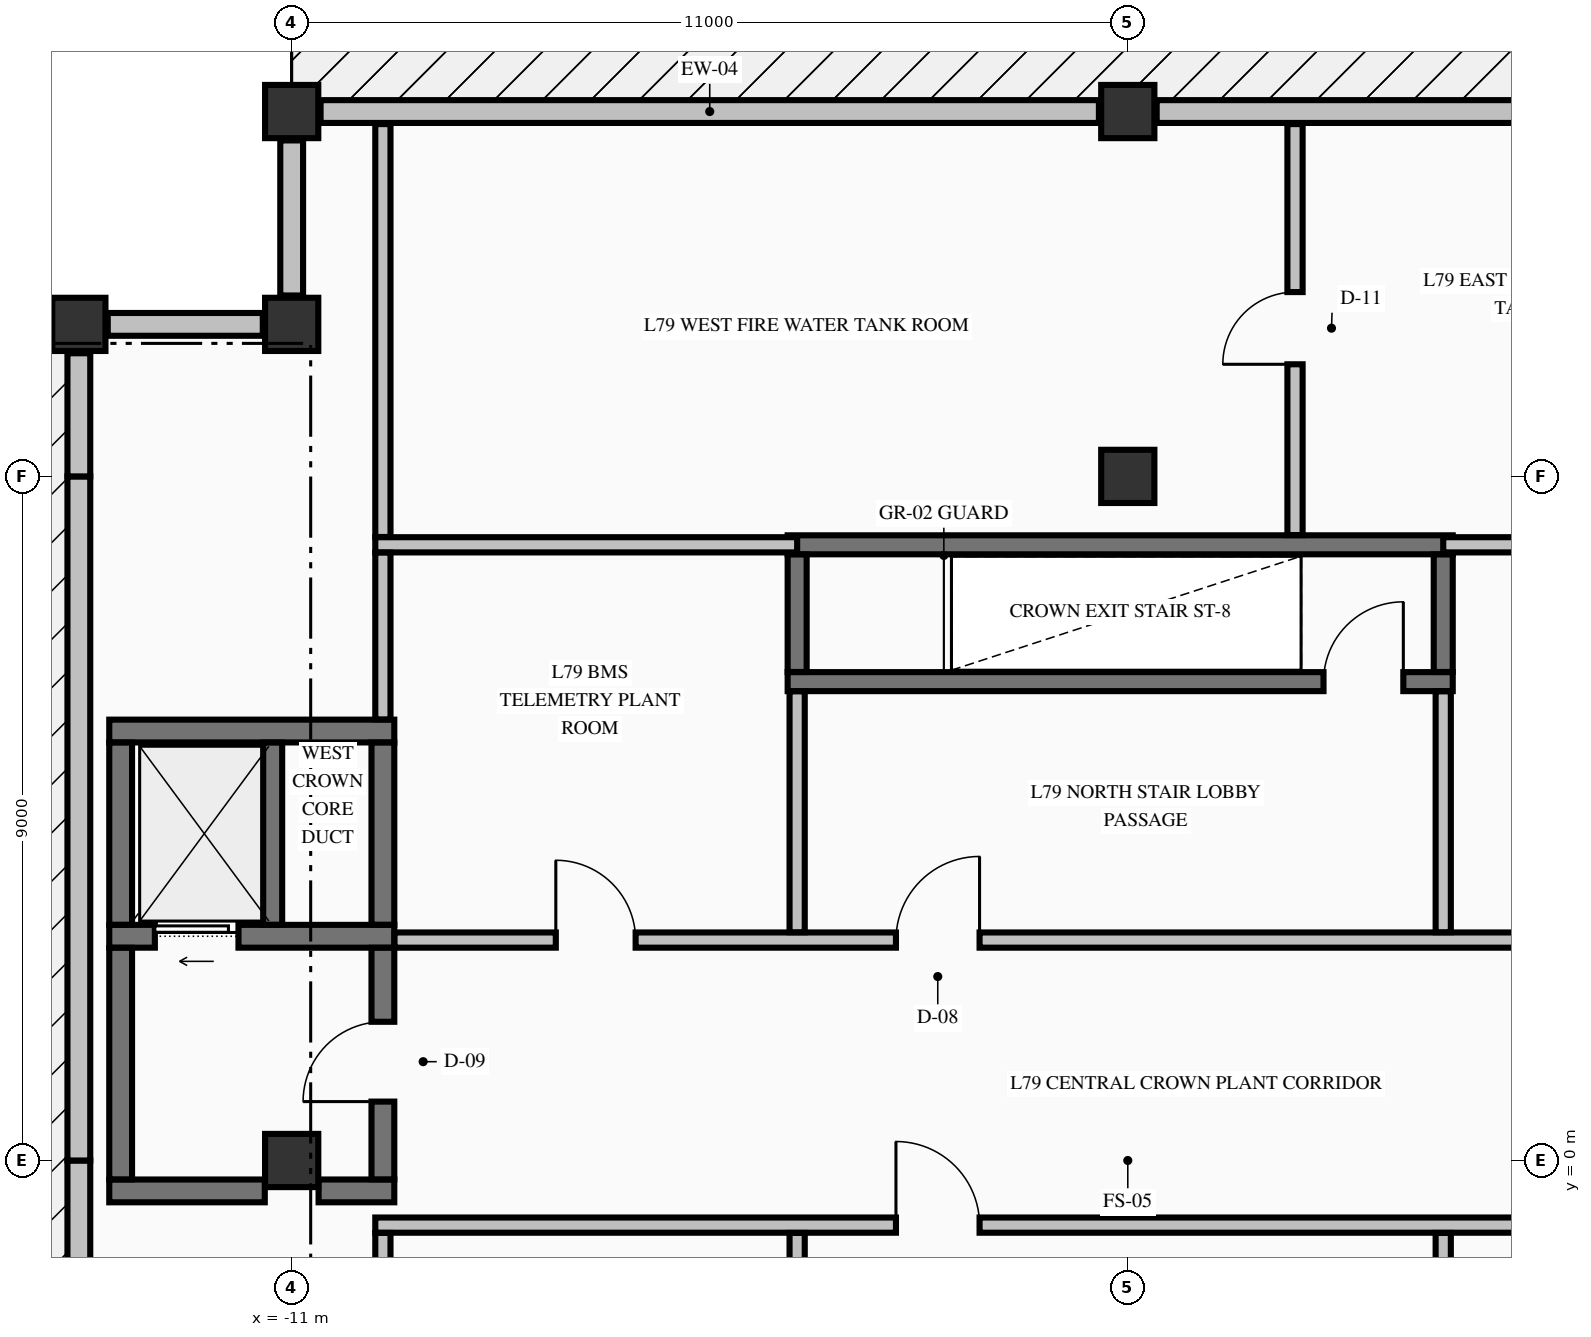
"""IFC4 building model, lengths in metres.
Left out: names, types, materials, properties, quantities, classifications, styles, units other than length and angle.
Written with IfcOpenShell. Run it as: python <this file> out.ifc"""

import sys

from ifc_helpers import new_model, si_unit, direction, frame, frame_2d, origin, origin_2d, place, context, subcontext, project, spatial, rectangle, extrude, element, fill, save


model = new_model("IFC4")
c1 = context("Model", 3, precision=1e-05, world=origin(), true_north=direction((0.0, 1.0)))
c2 = subcontext(c1, "Body", "Model", "MODEL_VIEW")
j1 = project(units=[si_unit("LENGTHUNIT", "METRE"), si_unit("PLANEANGLEUNIT", "RADIAN")], contexts=[c1])
p1 = place(None, origin())
s1 = spatial("IfcSite", under=j1, at=p1, CompositionType="ELEMENT")
p2 = place(p1, origin())
s2 = spatial("IfcBuilding", under=s1, at=p2, CompositionType="ELEMENT")
p3 = place(p2, frame((0.0, 0.0, 294.04)))
s3 = spatial("IfcBuildingStorey", under=s2, at=p3, CompositionType="ELEMENT", Elevation=294.04)
for number, where, z_axis, x_axis in (
    (1, (0.0, 13.8, -0.325), (0.0, 0.0, 1.0), (1.0, 0.0, 0.0)),
    (2, (-11.0, 13.8, -0.325), (0.0, 0.0, 1.0), (1.0, 0.0, 0.0)),
    (3, (-13.8, 11.0, -0.325), (0.0, 0.0, 1.0), (1.0, 0.0, 0.0)),
    (4, (-11.0, 11.0, -0.325), (0.0, 0.0, 1.0), (1.0, 0.0, 0.0)),
    (5, (-11.0, 0.0, -0.325), (0.0, 0.0, 1.0), (1.0, 0.0, 0.0)),
    (6, (0.0, 9.0, -0.325), (0.0, 0.0, 1.0), (1.0, 0.0, 0.0)),
):
    element("IfcColumn", number, at=place(p3, frame(where, z_axis=z_axis, x_axis=x_axis)), inside=s3, PredefinedType="COLUMN", context=c2, shape_type="SweptSolid", body=[
        extrude(rectangle(XDim=0.7, YDim=0.7, at=origin_2d()), origin(), (0.0, 0.0, 1.0), 2.935),
    ])
for number, where, z_axis, x_axis in (
    (7, (-0.38, 13.8, 0.0), (0.0, 0.0, 1.0), (-1.0, 0.0, 0.0)),
    (8, (10.62, 13.8, 0.0), (0.0, 0.0, 1.0), (-1.0, 0.0, 0.0)),
):
    element("IfcWall", number, at=place(p3, frame(where, z_axis=z_axis, x_axis=x_axis)), inside=s3, PredefinedType="STANDARD", context=c2, shape_type="SweptSolid", body=[
        extrude(rectangle(XDim=10.24, YDim=0.3, at=frame_2d((5.12, 0.0))), origin(), (0.0, 0.0, 1.0), 2.002),
    ])
for number, where, z_axis, x_axis in (
    (9, (-13.8, 0.0, 0.0), (0.0, 0.0, 1.0), (0.0, -1.0, 0.0)),
    (10, (-13.8, 9.0, 0.0), (0.0, 0.0, 1.0), (0.0, -1.0, 0.0)),
):
    element("IfcWall", number, at=place(p3, frame(where, z_axis=z_axis, x_axis=x_axis)), inside=s3, PredefinedType="STANDARD", context=c2, shape_type="SweptSolid", body=[
        extrude(rectangle(XDim=9.0, YDim=0.3, at=frame_2d((4.5, 0.0))), origin(), (0.0, 0.0, 1.0), 2.002),
    ])
p4 = place(p3, frame((-13.8, 10.62, 0.0), z_axis=(0.0, 0.0, 1.0), x_axis=(0.0, -1.0, 0.0)))
e11 = element("IfcWall", 11, at=p4, inside=s3, PredefinedType="STANDARD", context=c2, shape_type="SweptSolid", body=[
    extrude(rectangle(XDim=1.62, YDim=0.3, at=frame_2d((0.81, 0.0))), origin(), (0.0, 0.0, 1.0), 2.002),
])
for number, where, z_axis, x_axis in (
    (12, (-11.0, 13.42, 0.0), (0.0, 0.0, 1.0), (0.0, -1.0, 0.0)),
    (13, (-11.38, 11.0, 0.0), (0.0, 0.0, 1.0), (-1.0, 0.0, 0.0)),
):
    element("IfcWall", number, at=place(p3, frame(where, z_axis=z_axis, x_axis=x_axis)), inside=s3, PredefinedType="STANDARD", context=c2, shape_type="SweptSolid", body=[
        extrude(rectangle(XDim=2.04, YDim=0.3, at=frame_2d((1.02, 0.0))), origin(), (0.0, 0.0, 1.0), 2.002),
    ])
p5 = place(p3, frame((-13.4, -0.4, 0.0), z_axis=(0.0, 0.0, 1.0), x_axis=(1.0, 0.0, 0.0)))
e14 = element("IfcWall", 14, at=p5, inside=s3, PredefinedType="SHEAR", context=c2, shape_type="SweptSolid", body=[
    extrude(rectangle(XDim=2.046, YDim=0.3, at=frame_2d((1.023, 0.0))), origin(), (0.0, 0.0, 1.0), 2.61),
])
p6 = place(p3, frame((-10.646, -0.4, 0.0), z_axis=(0.0, 0.0, 1.0), x_axis=(1.0, 0.0, 0.0)))
e15 = element("IfcWall", 15, at=p6, inside=s3, PredefinedType="SHEAR", context=c2, shape_type="SweptSolid", body=[
    extrude(rectangle(XDim=0.996, YDim=0.3, at=frame_2d((0.498, 0.0))), origin(), (0.0, 0.0, 1.0), 2.61),
])
p7 = place(p3, frame((-13.4, 2.95, 0.0), z_axis=(0.0, 0.0, 1.0), x_axis=(1.0, 0.0, 0.0)))
e16 = element("IfcWall", 16, at=p7, inside=s3, PredefinedType="SHEAR", context=c2, shape_type="SweptSolid", body=[
    extrude(rectangle(XDim=3.75, YDim=0.3, at=frame_2d((1.875, 0.0))), origin(), (0.0, 0.0, 1.0), 2.61),
])
p8 = place(p7, frame((0.6, 0.0, 0.0)))
e17 = element("IfcOpeningElement", 17, at=p8, cuts=e16, PredefinedType="OPENING", context=c2, shape_type="SweptSolid", body=[
    extrude(rectangle(XDim=1.1, YDim=2.2, at=frame_2d((0.55, 1.1))), frame((0.0, 0.16, 0.0), z_axis=(0.0, -1.0, 0.0), x_axis=(1.0, 0.0, 0.0)), (0.0, 0.0, 1.0), 0.32),
])
p9 = place(p3, frame((-13.4, 5.65, 0.0), z_axis=(0.0, 0.0, 1.0), x_axis=(1.0, 0.0, 0.0)))
e18 = element("IfcWall", 18, at=p9, inside=s3, PredefinedType="SHEAR", context=c2, shape_type="SweptSolid", body=[
    extrude(rectangle(XDim=3.75, YDim=0.3, at=frame_2d((1.875, 0.0))), origin(), (0.0, 0.0, 1.0), 2.61),
])
p10 = place(p3, frame((-4.475, 6.3, 0.0), z_axis=(0.0, 0.0, 1.0), x_axis=(1.0, 0.0, 0.0)))
e19 = element("IfcWall", 19, at=p10, inside=s3, PredefinedType="SOLIDWALL", context=c2, shape_type="SweptSolid", body=[
    extrude(rectangle(XDim=8.75, YDim=0.25, at=frame_2d((4.375, 0.0))), origin(), (0.0, 0.0, 1.0), 2.61),
])
p11 = place(p10, frame((7.05, 0.0, 0.0)))
e20 = element("IfcOpeningElement", 20, at=p11, cuts=e19, PredefinedType="OPENING", context=c2, shape_type="SweptSolid", body=[
    extrude(rectangle(XDim=1.05, YDim=2.15, at=frame_2d((0.525, 1.075))), frame((0.0, 0.135, 0.0), z_axis=(0.0, -1.0, 0.0), x_axis=(1.0, 0.0, 0.0)), (0.0, 0.0, 1.0), 0.27),
])
p12 = place(p3, frame((-4.475, 8.1, 0.0), z_axis=(0.0, 0.0, 1.0), x_axis=(1.0, 0.0, 0.0)))
e21 = element("IfcWall", 21, at=p12, inside=s3, PredefinedType="SOLIDWALL", context=c2, shape_type="SweptSolid", body=[
    extrude(rectangle(XDim=8.75, YDim=0.25, at=frame_2d((4.375, 0.0))), origin(), (0.0, 0.0, 1.0), 2.61),
])
p13 = place(p3, frame((-9.9, -0.85, 0.0), z_axis=(0.0, 0.0, 1.0), x_axis=(1.0, 0.0, 0.0)))
e22 = element("IfcWall", 22, at=p13, inside=s3, PredefinedType="PARTITIONING", context=c2, shape_type="SweptSolid", body=[
    extrude(rectangle(XDim=19.8, YDim=0.2, at=frame_2d((9.9, 0.0))), origin(), (0.0, 0.0, 1.0), 2.61),
])
p14 = place(p13, frame((6.85, 0.0, 0.0)))
e23 = element("IfcOpeningElement", 23, at=p14, cuts=e22, PredefinedType="OPENING", context=c2, shape_type="SweptSolid", body=[
    extrude(rectangle(XDim=1.1, YDim=2.15, at=frame_2d((0.55, 1.075))), frame((0.0, 0.11, 0.0), z_axis=(0.0, -1.0, 0.0), x_axis=(1.0, 0.0, 0.0)), (0.0, 0.0, 1.0), 0.22),
])
p15 = place(p3, frame((-9.647, 2.9, 0.0), z_axis=(0.0, 0.0, 1.0), x_axis=(1.0, 0.0, 0.0)))
e24 = element("IfcWall", 24, at=p15, inside=s3, PredefinedType="PARTITIONING", context=c2, shape_type="SweptSolid", body=[
    extrude(rectangle(XDim=19.294, YDim=0.2, at=frame_2d((9.647, 0.0))), origin(), (0.0, 0.0, 1.0), 2.61),
])
p16 = place(p15, frame((6.597, 0.0, 0.0)))
e25 = element("IfcOpeningElement", 25, at=p16, cuts=e24, PredefinedType="OPENING", context=c2, shape_type="SweptSolid", body=[
    extrude(rectangle(XDim=1.1, YDim=2.15, at=frame_2d((0.55, 1.075))), frame((0.0, 0.11, 0.0), z_axis=(0.0, -1.0, 0.0), x_axis=(1.0, 0.0, 0.0)), (0.0, 0.0, 1.0), 0.22),
])
p17 = place(p15, frame((16.122, 0.0, 0.0)))
e26 = element("IfcOpeningElement", 26, at=p17, cuts=e24, PredefinedType="OPENING", context=c2, shape_type="SweptSolid", body=[
    extrude(rectangle(XDim=1.05, YDim=2.15, at=frame_2d((0.525, 1.075))), frame((0.0, 0.11, 0.0), z_axis=(0.0, -1.0, 0.0), x_axis=(1.0, 0.0, 0.0)), (0.0, 0.0, 1.0), 0.22),
])
p18 = place(p15, frame((2.122, 0.0, 0.0)))
e27 = element("IfcOpeningElement", 27, at=p18, cuts=e24, PredefinedType="OPENING", context=c2, shape_type="SweptSolid", body=[
    extrude(rectangle(XDim=1.05, YDim=2.15, at=frame_2d((0.525, 1.075))), frame((0.0, 0.11, 0.0), z_axis=(0.0, -1.0, 0.0), x_axis=(1.0, 0.0, 0.0)), (0.0, 0.0, 1.0), 0.22),
])
p19 = place(p3, frame((-9.9, 8.1, 0.0), z_axis=(0.0, 0.0, 1.0), x_axis=(1.0, 0.0, 0.0)))
e28 = element("IfcWall", 28, at=p19, inside=s3, PredefinedType="PARTITIONING", context=c2, shape_type="SweptSolid", body=[
    extrude(rectangle(XDim=5.55, YDim=0.2, at=frame_2d((2.775, 0.0))), origin(), (0.0, 0.0, 1.0), 2.61),
])
p20 = place(p3, frame((4.15, 8.1, 0.0), z_axis=(0.0, 0.0, 1.0), x_axis=(1.0, 0.0, 0.0)))
e29 = element("IfcWall", 29, at=p20, inside=s3, PredefinedType="PARTITIONING", context=c2, shape_type="SweptSolid", body=[
    extrude(rectangle(XDim=5.75, YDim=0.2, at=frame_2d((2.875, 0.0))), origin(), (0.0, 0.0, 1.0), 2.61),
])
p21 = place(p20, frame((2.125, 0.0, 0.0)))
e30 = element("IfcOpeningElement", 30, at=p21, cuts=e29, PredefinedType="OPENING", context=c2, shape_type="SweptSolid", body=[
    extrude(rectangle(XDim=1.05, YDim=2.15, at=frame_2d((0.525, 1.075))), frame((0.0, 0.11, 0.0), z_axis=(0.0, -1.0, 0.0), x_axis=(1.0, 0.0, 0.0)), (0.0, 0.0, 1.0), 0.22),
])
p22 = place(p3, frame((-13.25, -0.248, 0.0), z_axis=(0.0, 0.0, 1.0), x_axis=(0.0, 1.0, 0.0)))
e31 = element("IfcWall", 31, at=p22, inside=s3, PredefinedType="SHEAR", context=c2, shape_type="SweptSolid", body=[
    extrude(rectangle(XDim=3.046, YDim=0.3, at=frame_2d((1.523, 0.0))), origin(), (0.0, 0.0, 1.0), 2.61),
])
p23 = place(p3, frame((-13.25, 3.102, 0.0), z_axis=(0.0, 0.0, 1.0), x_axis=(0.0, 1.0, 0.0)))
e32 = element("IfcWall", 32, at=p23, inside=s3, PredefinedType="SHEAR", context=c2, shape_type="SweptSolid", body=[
    extrude(rectangle(XDim=2.396, YDim=0.3, at=frame_2d((1.198, 0.0))), origin(), (0.0, 0.0, 1.0), 2.61),
])
p24 = place(p3, frame((-11.25, 3.102, 0.0), z_axis=(0.0, 0.0, 1.0), x_axis=(0.0, 1.0, 0.0)))
e33 = element("IfcWall", 33, at=p24, inside=s3, PredefinedType="SOLIDWALL", context=c2, shape_type="SweptSolid", body=[
    extrude(rectangle(XDim=2.396, YDim=0.25, at=frame_2d((1.198, 0.0))), origin(), (0.0, 0.0, 1.0), 2.61),
])
p25 = place(p3, frame((-9.8, -0.248, 0.0), z_axis=(0.0, 0.0, 1.0), x_axis=(0.0, 1.0, 0.0)))
e34 = element("IfcWall", 34, at=p25, inside=s3, PredefinedType="SHEAR", context=c2, shape_type="SweptSolid", body=[
    extrude(rectangle(XDim=3.046, YDim=0.3, at=frame_2d((1.523, 0.0))), origin(), (0.0, 0.0, 1.0), 2.61),
])
p26 = place(p25, frame((1.023, 0.0, 0.0)))
e35 = element("IfcOpeningElement", 35, at=p26, cuts=e34, PredefinedType="OPENING", context=c2, shape_type="SweptSolid", body=[
    extrude(rectangle(XDim=1.05, YDim=2.15, at=frame_2d((0.525, 1.075))), frame((0.0, 0.16, 0.0), z_axis=(0.0, -1.0, 0.0), x_axis=(1.0, 0.0, 0.0)), (0.0, 0.0, 1.0), 0.32),
])
p27 = place(p3, frame((-9.8, 3.102, 0.0), z_axis=(0.0, 0.0, 1.0), x_axis=(0.0, 1.0, 0.0)))
e36 = element("IfcWall", 36, at=p27, inside=s3, PredefinedType="SHEAR", context=c2, shape_type="SweptSolid", body=[
    extrude(rectangle(XDim=2.396, YDim=0.3, at=frame_2d((1.198, 0.0))), origin(), (0.0, 0.0, 1.0), 2.61),
])
for number, where, z_axis, x_axis in (
    (37, (-4.35, 6.427, 0.0), (0.0, 0.0, 1.0), (0.0, 1.0, 0.0)),
    (38, (4.15, 6.427, 0.0), (0.0, 0.0, 1.0), (0.0, 1.0, 0.0)),
):
    element("IfcWall", number, at=place(p3, frame(where, z_axis=z_axis, x_axis=x_axis)), inside=s3, PredefinedType="SOLIDWALL", context=c2, shape_type="SweptSolid", body=[
        extrude(rectangle(XDim=1.546, YDim=0.25, at=frame_2d((0.773, 0.0))), origin(), (0.0, 0.0, 1.0), 2.61),
    ])
p28 = place(p3, frame((-9.8, -6.197, 0.0), z_axis=(0.0, 0.0, 1.0), x_axis=(0.0, 1.0, 0.0)))
e39 = element("IfcWall", 39, at=p28, inside=s3, PredefinedType="PARTITIONING", context=c2, shape_type="SweptSolid", body=[
    extrude(rectangle(XDim=5.244, YDim=0.2, at=frame_2d((2.622, 0.0))), origin(), (0.0, 0.0, 1.0), 2.61),
])
p29 = place(p3, frame((-9.8, 5.803, 0.0), z_axis=(0.0, 0.0, 1.0), x_axis=(0.0, 1.0, 0.0)))
e40 = element("IfcWall", 40, at=p29, inside=s3, PredefinedType="PARTITIONING", context=c2, shape_type="SweptSolid", body=[
    extrude(rectangle(XDim=2.194, YDim=0.2, at=frame_2d((1.097, 0.0))), origin(), (0.0, 0.0, 1.0), 2.61),
])
p30 = place(p3, frame((-9.8, 8.203, 0.0), z_axis=(0.0, 0.0, 1.0), x_axis=(0.0, 1.0, 0.0)))
e41 = element("IfcWall", 41, at=p30, inside=s3, PredefinedType="PARTITIONING", context=c2, shape_type="SweptSolid", body=[
    extrude(rectangle(XDim=5.432, YDim=0.2, at=frame_2d((2.716, 0.0))), origin(), (0.0, 0.0, 1.0), 2.61),
])
p31 = place(p3, frame((-4.35, -6.172, 0.0), z_axis=(0.0, 0.0, 1.0), x_axis=(0.0, 1.0, 0.0)))
e42 = element("IfcWall", 42, at=p31, inside=s3, PredefinedType="PARTITIONING", context=c2, shape_type="SweptSolid", body=[
    extrude(rectangle(XDim=5.219, YDim=0.2, at=frame_2d((2.61, 0.0))), origin(), (0.0, 0.0, 1.0), 2.61),
])
p32 = place(p31, frame((2.447, 0.0, 0.0)))
e43 = element("IfcOpeningElement", 43, at=p32, cuts=e42, PredefinedType="OPENING", context=c2, shape_type="SweptSolid", body=[
    extrude(rectangle(XDim=1.05, YDim=2.15, at=frame_2d((0.525, 1.075))), frame((0.0, 0.11, 0.0), z_axis=(0.0, -1.0, 0.0), x_axis=(1.0, 0.0, 0.0)), (0.0, 0.0, 1.0), 0.22),
])
p33 = place(p3, frame((-4.35, 3.003, 0.0), z_axis=(0.0, 0.0, 1.0), x_axis=(0.0, 1.0, 0.0)))
e44 = element("IfcWall", 44, at=p33, inside=s3, PredefinedType="PARTITIONING", context=c2, shape_type="SweptSolid", body=[
    extrude(rectangle(XDim=3.169, YDim=0.2, at=frame_2d((1.584, 0.0))), origin(), (0.0, 0.0, 1.0), 2.61),
])
p34 = place(p3, frame((2.2, 8.228, 0.0), z_axis=(0.0, 0.0, 1.0), x_axis=(0.0, 1.0, 0.0)))
e45 = element("IfcWall", 45, at=p34, inside=s3, PredefinedType="PARTITIONING", context=c2, shape_type="SweptSolid", body=[
    extrude(rectangle(XDim=5.407, YDim=0.2, at=frame_2d((2.704, 0.0))), origin(), (0.0, 0.0, 1.0), 2.61),
])
p35 = place(p34, frame((2.247, 0.0, 0.0)))
e46 = element("IfcOpeningElement", 46, at=p35, cuts=e45, PredefinedType="OPENING", context=c2, shape_type="SweptSolid", body=[
    extrude(rectangle(XDim=0.95, YDim=2.15, at=frame_2d((0.475, 1.075))), frame((0.0, 0.11, 0.0), z_axis=(0.0, -1.0, 0.0), x_axis=(1.0, 0.0, 0.0)), (0.0, 0.0, 1.0), 0.22),
])
p36 = place(p3, frame((4.15, -6.172, 0.0), z_axis=(0.0, 0.0, 1.0), x_axis=(0.0, 1.0, 0.0)))
e47 = element("IfcWall", 47, at=p36, inside=s3, PredefinedType="PARTITIONING", context=c2, shape_type="SweptSolid", body=[
    extrude(rectangle(XDim=5.219, YDim=0.2, at=frame_2d((2.61, 0.0))), origin(), (0.0, 0.0, 1.0), 2.61),
])
p37 = place(p36, frame((2.447, 0.0, 0.0)))
e48 = element("IfcOpeningElement", 48, at=p37, cuts=e47, PredefinedType="OPENING", context=c2, shape_type="SweptSolid", body=[
    extrude(rectangle(XDim=1.05, YDim=2.15, at=frame_2d((0.525, 1.075))), frame((0.0, 0.11, 0.0), z_axis=(0.0, -1.0, 0.0), x_axis=(1.0, 0.0, 0.0)), (0.0, 0.0, 1.0), 0.22),
])
p38 = place(p3, frame((4.15, 3.003, 0.0), z_axis=(0.0, 0.0, 1.0), x_axis=(0.0, 1.0, 0.0)))
e49 = element("IfcWall", 49, at=p38, inside=s3, PredefinedType="PARTITIONING", context=c2, shape_type="SweptSolid", body=[
    extrude(rectangle(XDim=3.169, YDim=0.2, at=frame_2d((1.584, 0.0))), origin(), (0.0, 0.0, 1.0), 2.61),
])
p39 = place(p8, origin())
e50 = element("IfcDoor", 50, at=p39, inside=s3, OperationType="SLIDING_TO_LEFT", PredefinedType="DOOR", context=c2, shape_type="SweptSolid", body=[
    extrude(rectangle(XDim=1.1, YDim=2.2, at=frame_2d((0.55, 1.1))), frame((0.0, 0.025, 0.0), z_axis=(0.0, -1.0, 0.0), x_axis=(1.0, 0.0, 0.0)), (0.0, 0.0, 1.0), 0.05),
])
fill(e17, e50)
p40 = place(p26, origin())
e51 = element("IfcDoor", 51, at=p40, inside=s3, OperationType="SINGLE_SWING_LEFT", PredefinedType="DOOR", context=c2, shape_type="SweptSolid", body=[
    extrude(rectangle(XDim=1.05, YDim=2.15, at=frame_2d((0.525, 1.075))), frame((0.0, 0.025, 0.0), z_axis=(0.0, -1.0, 0.0), x_axis=(1.0, 0.0, 0.0)), (0.0, 0.0, 1.0), 0.05),
])
fill(e35, e51)
p41 = place(p11, origin())
e52 = element("IfcDoor", 52, at=p41, inside=s3, OperationType="SINGLE_SWING_RIGHT", PredefinedType="DOOR", context=c2, shape_type="SweptSolid", body=[
    extrude(rectangle(XDim=1.05, YDim=2.15, at=frame_2d((0.525, 1.075))), frame((0.0, 0.025, 0.0), z_axis=(0.0, -1.0, 0.0), x_axis=(1.0, 0.0, 0.0)), (0.0, 0.0, 1.0), 0.05),
])
fill(e20, e52)
p42 = place(p14, origin())
e53 = element("IfcDoor", 53, at=p42, inside=s3, OperationType="SINGLE_SWING_LEFT", PredefinedType="DOOR", context=c2, shape_type="SweptSolid", body=[
    extrude(rectangle(XDim=1.1, YDim=2.15, at=frame_2d((0.55, 1.075))), frame((0.0, 0.025, 0.0), z_axis=(0.0, -1.0, 0.0), x_axis=(1.0, 0.0, 0.0)), (0.0, 0.0, 1.0), 0.05),
])
fill(e23, e53)
p43 = place(p16, origin())
e54 = element("IfcDoor", 54, at=p43, inside=s3, OperationType="SINGLE_SWING_RIGHT", PredefinedType="DOOR", context=c2, shape_type="SweptSolid", body=[
    extrude(rectangle(XDim=1.1, YDim=2.15, at=frame_2d((0.55, 1.075))), frame((0.0, 0.025, 0.0), z_axis=(0.0, -1.0, 0.0), x_axis=(1.0, 0.0, 0.0)), (0.0, 0.0, 1.0), 0.05),
])
fill(e25, e54)
p44 = place(p35, origin())
e55 = element("IfcDoor", 55, at=p44, inside=s3, OperationType="SINGLE_SWING_LEFT", PredefinedType="DOOR", context=c2, shape_type="SweptSolid", body=[
    extrude(rectangle(XDim=0.95, YDim=2.15, at=frame_2d((0.475, 1.075))), frame((0.0, 0.025, 0.0), z_axis=(0.0, -1.0, 0.0), x_axis=(1.0, 0.0, 0.0)), (0.0, 0.0, 1.0), 0.05),
])
fill(e46, e55)
p45 = place(p18, origin())
e56 = element("IfcDoor", 56, at=p45, inside=s3, OperationType="SINGLE_SWING_LEFT", PredefinedType="DOOR", context=c2, shape_type="SweptSolid", body=[
    extrude(rectangle(XDim=1.05, YDim=2.15, at=frame_2d((0.525, 1.075))), frame((0.0, 0.025, 0.0), z_axis=(0.0, -1.0, 0.0), x_axis=(1.0, 0.0, 0.0)), (0.0, 0.0, 1.0), 0.05),
])
fill(e27, e56)
save(model, sys.argv[1])
